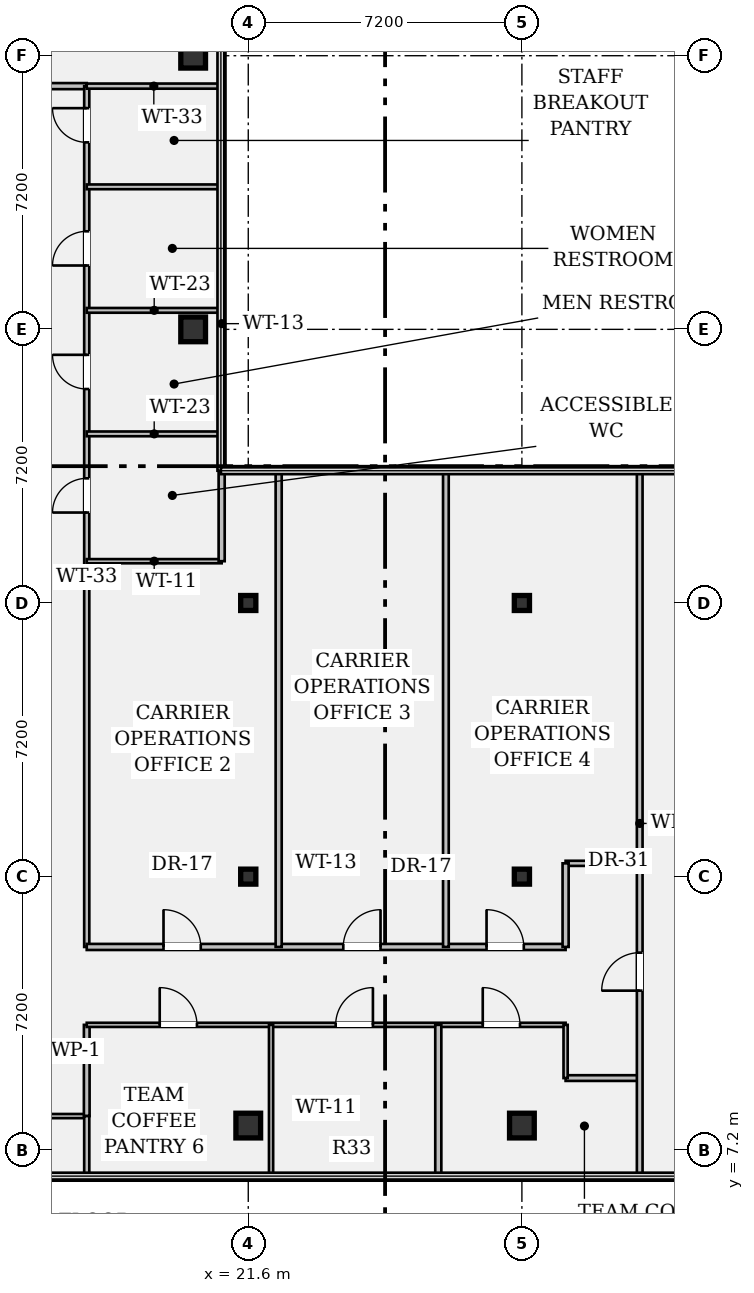
"""IFC4 building model, lengths in metres.
Left out: names, types, materials, properties, quantities, classifications, styles, units other than length and angle.
Written with IfcOpenShell. Run it as: python <this file> out.ifc"""

import sys

from ifc_helpers import new_model, si_unit, direction, frame, frame_2d, origin, origin_2d, place, context, subcontext, project, spatial, rectangle, hollow_rectangle, i_section, extrude, element, fill, save


model = new_model("IFC4")
c1 = context("Model", 3, precision=1e-05, world=origin(), true_north=direction((0.0, 1.0)))
c2 = subcontext(c1, "Body", "Model", "MODEL_VIEW")
j1 = project(units=[si_unit("LENGTHUNIT", "METRE"), si_unit("PLANEANGLEUNIT", "RADIAN")], contexts=[c1])
p1 = place(None, origin())
s1 = spatial("IfcSite", under=j1, at=p1, CompositionType="ELEMENT")
p2 = place(p1, origin())
s2 = spatial("IfcBuilding", under=s1, at=p2, CompositionType="ELEMENT")
p3 = place(p2, frame((0.0, 0.0, 290.15)))
s3 = spatial("IfcBuildingStorey", under=s2, at=p3, CompositionType="ELEMENT", Elevation=290.15)
for number, where, z_axis, x_axis in (
    (1, (20.15, 28.8, 0.0), (0.0, 0.0, 1.0), (1.0, 0.0, 0.0)),
    (2, (20.15, 36.0, 0.0), (0.0, 0.0, 1.0), (1.0, 0.0, 0.0)),
    (3, (21.6, 7.85, 0.0), (0.0, 0.0, 1.0), (1.0, 0.0, 0.0)),
):
    element("IfcColumn", number, at=place(p3, frame(where, z_axis=z_axis, x_axis=x_axis)), inside=s3, PredefinedType="COLUMN", context=c2, shape_type="SweptSolid", body=[
        extrude(hollow_rectangle(XDim=0.65, YDim=0.65, WallThickness=0.04, at=origin_2d()), origin(), (0.0, 0.0, 1.0), 3.24),
    ])
for number, where, z_axis, x_axis in (
    (4, (21.6, 14.4, 0.0), (0.0, 0.0, 1.0), (1.0, 0.0, 0.0)),
    (5, (21.6, 21.6, 0.0), (0.0, 0.0, 1.0), (1.0, 0.0, 0.0)),
):
    element("IfcColumn", number, at=place(p3, frame(where, z_axis=z_axis, x_axis=x_axis)), inside=s3, PredefinedType="COLUMN", context=c2, shape_type="SweptSolid", body=[
        extrude(i_section(OverallWidth=0.399, OverallDepth=0.394, WebThickness=0.023, FlangeThickness=0.037, FilletRadius=0.018, at=origin_2d()), origin(), (0.0, 0.0, 1.0), 3.24),
    ])
p4 = place(p3, frame((28.8, 7.85, 0.0), z_axis=(0.0, 0.0, 1.0), x_axis=(1.0, 0.0, 0.0)))
e6 = element("IfcColumn", 6, at=p4, inside=s3, PredefinedType="COLUMN", context=c2, shape_type="SweptSolid", body=[
    extrude(hollow_rectangle(XDim=0.65, YDim=0.65, WallThickness=0.04, at=origin_2d()), origin(), (0.0, 0.0, 1.0), 3.24),
])
for number, where, z_axis, x_axis in (
    (7, (28.8, 14.4, 0.0), (0.0, 0.0, 1.0), (1.0, 0.0, 0.0)),
    (8, (28.8, 21.6, 0.0), (0.0, 0.0, 1.0), (1.0, 0.0, 0.0)),
):
    element("IfcColumn", number, at=place(p3, frame(where, z_axis=z_axis, x_axis=x_axis)), inside=s3, PredefinedType="COLUMN", context=c2, shape_type="SweptSolid", body=[
        extrude(i_section(OverallWidth=0.399, OverallDepth=0.394, WebThickness=0.023, FlangeThickness=0.037, FilletRadius=0.018, at=origin_2d()), origin(), (0.0, 0.0, 1.0), 3.24),
    ])
p5 = place(p3, frame((14.4, 8.1, 0.0), z_axis=(0.0, 0.0, 1.0), x_axis=(1.0, 0.0, 0.0)))
e9 = element("IfcWall", 9, at=p5, inside=s3, PredefinedType="PARTITIONING", context=c2, shape_type="SweptSolid", body=[
    extrude(rectangle(XDim=2.95, YDim=0.11, at=frame_2d((1.475, 0.0))), origin(), (0.0, 0.0, 1.0), 3.24),
])
p6 = place(p5, frame((0.95, 0.0, 0.0)))
e10 = element("IfcOpeningElement", 10, at=p6, cuts=e9, PredefinedType="OPENING", context=c2, shape_type="SweptSolid", body=[
    extrude(rectangle(XDim=0.98, YDim=2.15, at=frame_2d((0.49, 1.075))), frame((0.0, 0.067, 0.0), z_axis=(0.0, -1.0, 0.0), x_axis=(1.0, 0.0, 0.0)), (0.0, 0.0, 1.0), 0.134),
])
p7 = place(p3, frame((14.4, 35.2, 0.0), z_axis=(0.0, 0.0, 1.0), x_axis=(1.0, 0.0, 0.0)))
e11 = element("IfcWall", 11, at=p7, inside=s3, PredefinedType="PARTITIONING", context=c2, shape_type="SweptSolid", body=[
    extrude(rectangle(XDim=2.95, YDim=0.16, at=frame_2d((1.475, 0.0))), origin(), (0.0, 0.0, 1.0), 3.24),
])
p8 = place(p7, frame((0.95, 0.0, 0.0)))
e12 = element("IfcOpeningElement", 12, at=p8, cuts=e11, PredefinedType="OPENING", context=c2, shape_type="SweptSolid", body=[
    extrude(rectangle(XDim=1.0, YDim=2.15, at=frame_2d((0.5, 1.075))), frame((0.0, 0.092, 0.0), z_axis=(0.0, -1.0, 0.0), x_axis=(1.0, 0.0, 0.0)), (0.0, 0.0, 1.0), 0.184),
])
p9 = place(p3, frame((17.35, 8.1, 0.0), z_axis=(0.0, 0.0, 1.0), x_axis=(0.0, 1.0, 0.0)))
e13 = element("IfcWall", 13, at=p9, inside=s3, PredefinedType="PARTITIONING", context=c2, shape_type="SweptSolid", body=[
    extrude(rectangle(XDim=2.4, YDim=0.15, at=frame_2d((1.2, 0.0))), origin(), (0.0, 0.0, 1.0), 3.24),
])
p10 = place(p3, frame((17.35, 12.55, 0.0), z_axis=(0.0, 0.0, 1.0), x_axis=(0.0, 1.0, 0.0)))
e14 = element("IfcWall", 14, at=p10, inside=s3, PredefinedType="PARTITIONING", context=c2, shape_type="SweptSolid", body=[
    extrude(rectangle(XDim=22.65, YDim=0.135, at=frame_2d((11.325, 0.0))), origin(), (0.0, 0.0, 1.0), 2.676),
])
p11 = place(p10, frame((11.43, 0.0, 0.0)))
e15 = element("IfcOpeningElement", 15, at=p11, cuts=e14, PredefinedType="OPENING", context=c2, shape_type="SweptSolid", body=[
    extrude(rectangle(XDim=0.9, YDim=2.15, at=frame_2d((0.45, 1.075))), frame((0.0, 0.08, 0.0), z_axis=(0.0, -1.0, 0.0), x_axis=(1.0, 0.0, 0.0)), (0.0, 0.0, 1.0), 0.159),
])
p12 = place(p10, frame((14.68, 0.0, 0.0)))
e16 = element("IfcOpeningElement", 16, at=p12, cuts=e14, PredefinedType="OPENING", context=c2, shape_type="SweptSolid", body=[
    extrude(rectangle(XDim=0.9, YDim=2.15, at=frame_2d((0.45, 1.075))), frame((0.0, 0.08, 0.0), z_axis=(0.0, -1.0, 0.0), x_axis=(1.0, 0.0, 0.0)), (0.0, 0.0, 1.0), 0.159),
])
p13 = place(p10, frame((17.93, 0.0, 0.0)))
e17 = element("IfcOpeningElement", 17, at=p13, cuts=e14, PredefinedType="OPENING", context=c2, shape_type="SweptSolid", body=[
    extrude(rectangle(XDim=0.9, YDim=2.15, at=frame_2d((0.45, 1.075))), frame((0.0, 0.08, 0.0), z_axis=(0.0, -1.0, 0.0), x_axis=(1.0, 0.0, 0.0)), (0.0, 0.0, 1.0), 0.159),
])
p14 = place(p10, frame((21.17, 0.0, 0.0)))
e18 = element("IfcOpeningElement", 18, at=p14, cuts=e14, PredefinedType="OPENING", context=c2, shape_type="SweptSolid", body=[
    extrude(rectangle(XDim=0.9, YDim=2.15, at=frame_2d((0.45, 1.075))), frame((0.0, 0.08, 0.0), z_axis=(0.0, -1.0, 0.0), x_axis=(1.0, 0.0, 0.0)), (0.0, 0.0, 1.0), 0.159),
])
p15 = place(p3, frame((17.35, 10.5, 0.0), z_axis=(0.0, 0.0, 1.0), x_axis=(1.0, 0.0, 0.0)))
e19 = element("IfcWall", 19, at=p15, inside=s3, PredefinedType="PARTITIONING", context=c2, shape_type="SweptSolid", body=[
    extrude(rectangle(XDim=12.6, YDim=0.11, at=frame_2d((6.3, 0.0))), origin(), (0.0, 0.0, 1.0), 2.676),
])
p16 = place(p15, frame((1.92, 0.0, 0.0)))
e20 = element("IfcOpeningElement", 20, at=p16, cuts=e19, PredefinedType="OPENING", context=c2, shape_type="SweptSolid", body=[
    extrude(rectangle(XDim=0.98, YDim=2.15, at=frame_2d((0.49, 1.075))), frame((0.0, 0.067, 0.0), z_axis=(0.0, -1.0, 0.0), x_axis=(1.0, 0.0, 0.0)), (0.0, 0.0, 1.0), 0.134),
])
p17 = place(p15, frame((6.55, 0.0, 0.0)))
e21 = element("IfcOpeningElement", 21, at=p17, cuts=e19, PredefinedType="OPENING", context=c2, shape_type="SweptSolid", body=[
    extrude(rectangle(XDim=0.98, YDim=2.15, at=frame_2d((0.49, 1.075))), frame((0.0, 0.067, 0.0), z_axis=(0.0, -1.0, 0.0), x_axis=(1.0, 0.0, 0.0)), (0.0, 0.0, 1.0), 0.134),
])
p18 = place(p15, frame((10.42, 0.0, 0.0)))
e22 = element("IfcOpeningElement", 22, at=p18, cuts=e19, PredefinedType="OPENING", context=c2, shape_type="SweptSolid", body=[
    extrude(rectangle(XDim=0.98, YDim=2.15, at=frame_2d((0.49, 1.075))), frame((0.0, 0.067, 0.0), z_axis=(0.0, -1.0, 0.0), x_axis=(1.0, 0.0, 0.0)), (0.0, 0.0, 1.0), 0.134),
])
p19 = place(p3, frame((17.35, 12.55, 0.0), z_axis=(0.0, 0.0, 1.0), x_axis=(1.0, 0.0, 0.0)))
e23 = element("IfcWall", 23, at=p19, inside=s3, PredefinedType="PARTITIONING", context=c2, shape_type="SweptSolid", body=[
    extrude(rectangle(XDim=12.6, YDim=0.16, at=frame_2d((6.3, 0.0))), origin(), (0.0, 0.0, 1.0), 2.676),
])
p20 = place(p19, frame((2.02, 0.0, 0.0)))
e24 = element("IfcOpeningElement", 24, at=p20, cuts=e23, PredefinedType="OPENING", context=c2, shape_type="SweptSolid", body=[
    extrude(rectangle(XDim=0.98, YDim=2.15, at=frame_2d((0.49, 1.075))), frame((0.0, 0.092, 0.0), z_axis=(0.0, -1.0, 0.0), x_axis=(1.0, 0.0, 0.0)), (0.0, 0.0, 1.0), 0.184),
])
p21 = place(p19, frame((6.75, 0.0, 0.0)))
e25 = element("IfcOpeningElement", 25, at=p21, cuts=e23, PredefinedType="OPENING", context=c2, shape_type="SweptSolid", body=[
    extrude(rectangle(XDim=0.98, YDim=2.15, at=frame_2d((0.49, 1.075))), frame((0.0, 0.092, 0.0), z_axis=(0.0, -1.0, 0.0), x_axis=(1.0, 0.0, 0.0)), (0.0, 0.0, 1.0), 0.184),
])
p22 = place(p19, frame((10.52, 0.0, 0.0)))
e26 = element("IfcOpeningElement", 26, at=p22, cuts=e23, PredefinedType="OPENING", context=c2, shape_type="SweptSolid", body=[
    extrude(rectangle(XDim=0.98, YDim=2.15, at=frame_2d((0.49, 1.075))), frame((0.0, 0.092, 0.0), z_axis=(0.0, -1.0, 0.0), x_axis=(1.0, 0.0, 0.0)), (0.0, 0.0, 1.0), 0.184),
])
p23 = place(p3, frame((29.95, 9.1, 0.0), z_axis=(0.0, 0.0, 1.0), x_axis=(1.0, 0.0, 0.0)))
e27 = element("IfcWall", 27, at=p23, inside=s3, PredefinedType="PARTITIONING", context=c2, shape_type="SweptSolid", body=[
    extrude(rectangle(XDim=1.95, YDim=0.15, at=frame_2d((0.975, 0.0))), origin(), (0.0, 0.0, 1.0), 3.24),
])
p24 = place(p3, frame((29.95, 14.75, 0.0), z_axis=(0.0, 0.0, 1.0), x_axis=(1.0, 0.0, 0.0)))
e28 = element("IfcWall", 28, at=p24, inside=s3, PredefinedType="PARTITIONING", context=c2, shape_type="SweptSolid", body=[
    extrude(rectangle(XDim=1.95, YDim=0.135, at=frame_2d((0.975, 0.0))), origin(), (0.0, 0.0, 1.0), 2.915),
])
p25 = place(p3, frame((29.95, 9.1, 0.0), z_axis=(0.0, 0.0, 1.0), x_axis=(0.0, 1.0, 0.0)))
e29 = element("IfcWall", 29, at=p25, inside=s3, PredefinedType="PARTITIONING", context=c2, shape_type="SweptSolid", body=[
    extrude(rectangle(XDim=1.4, YDim=0.11, at=frame_2d((0.7, 0.0))), origin(), (0.0, 0.0, 1.0), 3.24),
])
p26 = place(p3, frame((29.95, 12.55, 0.0), z_axis=(0.0, 0.0, 1.0), x_axis=(0.0, 1.0, 0.0)))
e30 = element("IfcWall", 30, at=p26, inside=s3, PredefinedType="PARTITIONING", context=c2, shape_type="SweptSolid", body=[
    extrude(rectangle(XDim=2.2, YDim=0.16, at=frame_2d((1.1, 0.0))), origin(), (0.0, 0.0, 1.0), 2.676),
])
p27 = place(p3, frame((31.9, 6.52, 0.0), z_axis=(0.0, 0.0, 1.0), x_axis=(0.0, 1.0, 0.0)))
e31 = element("IfcWall", 31, at=p27, inside=s3, PredefinedType="PARTITIONING", context=c2, shape_type="SweptSolid", body=[
    extrude(rectangle(XDim=18.56, YDim=0.15, at=frame_2d((9.28, 0.0))), origin(), (0.0, 0.0, 1.0), 2.676),
])
p28 = place(p27, frame((4.88, 0.0, 0.0)))
e32 = element("IfcOpeningElement", 32, at=p28, cuts=e31, PredefinedType="OPENING", context=c2, shape_type="SweptSolid", body=[
    extrude(rectangle(XDim=1.0, YDim=2.15, at=frame_2d((0.5, 1.075))), frame((0.0, 0.087, 0.0), z_axis=(0.0, -1.0, 0.0), x_axis=(1.0, 0.0, 0.0)), (0.0, 0.0, 1.0), 0.174),
])
p29 = place(p3, frame((17.35, 35.2, 0.0), z_axis=(0.0, 0.0, 1.0), x_axis=(1.0, 0.0, 0.0)))
e33 = element("IfcWall", 33, at=p29, inside=s3, PredefinedType="PARTITIONING", context=c2, shape_type="SweptSolid", body=[
    extrude(rectangle(XDim=3.53, YDim=0.135, at=frame_2d((1.765, 0.0))), origin(), (0.0, 0.0, 1.0), 3.24),
])
p30 = place(p3, frame((17.35, 22.7, 0.0), z_axis=(0.0, 0.0, 1.0), x_axis=(1.0, 0.0, 0.0)))
e34 = element("IfcWall", 34, at=p30, inside=s3, PredefinedType="PARTITIONING", context=c2, shape_type="SweptSolid", body=[
    extrude(rectangle(XDim=3.55, YDim=0.11, at=frame_2d((1.775, 0.0))), origin(), (0.0, 0.0, 1.0), 2.915),
])
p31 = place(p3, frame((20.9, 22.7, 0.0), z_axis=(0.0, 0.0, 1.0), x_axis=(0.0, 1.0, 0.0)))
e35 = element("IfcWall", 35, at=p31, inside=s3, PredefinedType="PARTITIONING", context=c2, shape_type="SweptSolid", body=[
    extrude(rectangle(XDim=12.5, YDim=0.16, at=frame_2d((6.25, 0.0))), origin(), (0.0, 0.0, 1.0), 3.24),
])
p32 = place(p3, frame((17.35, 26.05, 0.0), z_axis=(0.0, 0.0, 1.0), x_axis=(1.0, 0.0, 0.0)))
e36 = element("IfcWall", 36, at=p32, inside=s3, PredefinedType="PARTITIONING", context=c2, shape_type="SweptSolid", body=[
    extrude(rectangle(XDim=3.55, YDim=0.125, at=frame_2d((1.775, 0.0))), origin(), (0.0, 0.0, 1.0), 2.915),
])
for number, where, z_axis, x_axis in (
    (37, (17.35, 29.3, 0.0), (0.0, 0.0, 1.0), (1.0, 0.0, 0.0)),
    (38, (17.35, 32.55, 0.0), (0.0, 0.0, 1.0), (1.0, 0.0, 0.0)),
):
    element("IfcWall", number, at=place(p3, frame(where, z_axis=z_axis, x_axis=x_axis)), inside=s3, PredefinedType="PARTITIONING", context=c2, shape_type="SweptSolid", body=[
        extrude(rectangle(XDim=3.55, YDim=0.125, at=frame_2d((1.775, 0.0))), origin(), (0.0, 0.0, 1.0), 3.24),
    ])
p33 = place(p3, frame((22.4, 12.55, 0.0), z_axis=(0.0, 0.0, 1.0), x_axis=(0.0, 1.0, 0.0)))
e39 = element("IfcWall", 39, at=p33, inside=s3, PredefinedType="PARTITIONING", context=c2, shape_type="SweptSolid", body=[
    extrude(rectangle(XDim=12.5, YDim=0.16, at=frame_2d((6.25, 0.0))), origin(), (0.0, 0.0, 1.0), 2.325),
])
p34 = place(p3, frame((26.8, 12.55, 0.0), z_axis=(0.0, 0.0, 1.0), x_axis=(0.0, 1.0, 0.0)))
e40 = element("IfcWall", 40, at=p34, inside=s3, PredefinedType="PARTITIONING", context=c2, shape_type="SweptSolid", body=[
    extrude(rectangle(XDim=12.5, YDim=0.15, at=frame_2d((6.25, 0.0))), origin(), (0.0, 0.0, 1.0), 2.325),
])
p35 = place(p3, frame((17.35, 6.52, 0.0), z_axis=(0.0, 0.0, 1.0), x_axis=(0.0, 1.0, 0.0)))
e41 = element("IfcWall", 41, at=p35, inside=s3, PredefinedType="PARTITIONING", context=c2, shape_type="SweptSolid", body=[
    extrude(rectangle(XDim=1.58, YDim=0.135, at=frame_2d((0.79, 0.0))), origin(), (0.0, 0.0, 1.0), 3.24),
])
p36 = place(p3, frame((22.2, 6.52, 0.0), z_axis=(0.0, 0.0, 1.0), x_axis=(0.0, 1.0, 0.0)))
e42 = element("IfcWall", 42, at=p36, inside=s3, PredefinedType="PARTITIONING", context=c2, shape_type="SweptSolid", body=[
    extrude(rectangle(XDim=3.98, YDim=0.11, at=frame_2d((1.99, 0.0))), origin(), (0.0, 0.0, 1.0), 3.24),
])
p37 = place(p3, frame((26.6, 6.52, 0.0), z_axis=(0.0, 0.0, 1.0), x_axis=(0.0, 1.0, 0.0)))
e43 = element("IfcWall", 43, at=p37, inside=s3, PredefinedType="PARTITIONING", context=c2, shape_type="SweptSolid", body=[
    extrude(rectangle(XDim=3.98, YDim=0.16, at=frame_2d((1.99, 0.0))), origin(), (0.0, 0.0, 1.0), 3.24),
])
p38 = place(p11, origin())
e44 = element("IfcDoor", 44, at=p38, inside=s3, OperationType="SINGLE_SWING_LEFT", PredefinedType="DOOR", context=c2, shape_type="SweptSolid", body=[
    extrude(rectangle(XDim=0.9, YDim=2.15, at=frame_2d((0.45, 1.075))), frame((0.0, 0.025, 0.0), z_axis=(0.0, -1.0, 0.0), x_axis=(1.0, 0.0, 0.0)), (0.0, 0.0, 1.0), 0.05),
])
fill(e15, e44)
p39 = place(p12, origin())
e45 = element("IfcDoor", 45, at=p39, inside=s3, OperationType="SINGLE_SWING_RIGHT", PredefinedType="DOOR", context=c2, shape_type="SweptSolid", body=[
    extrude(rectangle(XDim=0.9, YDim=2.15, at=frame_2d((0.45, 1.075))), frame((0.0, 0.025, 0.0), z_axis=(0.0, -1.0, 0.0), x_axis=(1.0, 0.0, 0.0)), (0.0, 0.0, 1.0), 0.05),
])
fill(e16, e45)
p40 = place(p13, origin())
e46 = element("IfcDoor", 46, at=p40, inside=s3, OperationType="SINGLE_SWING_LEFT", PredefinedType="DOOR", context=c2, shape_type="SweptSolid", body=[
    extrude(rectangle(XDim=0.9, YDim=2.15, at=frame_2d((0.45, 1.075))), frame((0.0, 0.025, 0.0), z_axis=(0.0, -1.0, 0.0), x_axis=(1.0, 0.0, 0.0)), (0.0, 0.0, 1.0), 0.05),
])
fill(e17, e46)
p41 = place(p14, origin())
e47 = element("IfcDoor", 47, at=p41, inside=s3, OperationType="SINGLE_SWING_RIGHT", PredefinedType="DOOR", context=c2, shape_type="SweptSolid", body=[
    extrude(rectangle(XDim=0.9, YDim=2.15, at=frame_2d((0.45, 1.075))), frame((0.0, 0.025, 0.0), z_axis=(0.0, -1.0, 0.0), x_axis=(1.0, 0.0, 0.0)), (0.0, 0.0, 1.0), 0.05),
])
fill(e18, e47)
p42 = place(p20, origin())
e48 = element("IfcDoor", 48, at=p42, inside=s3, OperationType="SINGLE_SWING_LEFT", PredefinedType="DOOR", context=c2, shape_type="SweptSolid", body=[
    extrude(rectangle(XDim=0.98, YDim=2.15, at=frame_2d((0.49, 1.075))), frame((0.0, 0.025, 0.0), z_axis=(0.0, -1.0, 0.0), x_axis=(1.0, 0.0, 0.0)), (0.0, 0.0, 1.0), 0.05),
])
fill(e24, e48)
p43 = place(p21, origin())
e49 = element("IfcDoor", 49, at=p43, inside=s3, OperationType="SINGLE_SWING_RIGHT", PredefinedType="DOOR", context=c2, shape_type="SweptSolid", body=[
    extrude(rectangle(XDim=0.98, YDim=2.15, at=frame_2d((0.49, 1.075))), frame((0.0, 0.025, 0.0), z_axis=(0.0, -1.0, 0.0), x_axis=(1.0, 0.0, 0.0)), (0.0, 0.0, 1.0), 0.05),
])
fill(e25, e49)
p44 = place(p22, origin())
e50 = element("IfcDoor", 50, at=p44, inside=s3, OperationType="SINGLE_SWING_LEFT", PredefinedType="DOOR", context=c2, shape_type="SweptSolid", body=[
    extrude(rectangle(XDim=0.98, YDim=2.15, at=frame_2d((0.49, 1.075))), frame((0.0, 0.025, 0.0), z_axis=(0.0, -1.0, 0.0), x_axis=(1.0, 0.0, 0.0)), (0.0, 0.0, 1.0), 0.05),
])
fill(e26, e50)
p45 = place(p16, origin())
e51 = element("IfcDoor", 51, at=p45, inside=s3, OperationType="SINGLE_SWING_LEFT", PredefinedType="DOOR", context=c2, shape_type="SweptSolid", body=[
    extrude(rectangle(XDim=0.98, YDim=2.15, at=frame_2d((0.49, 1.075))), frame((0.0, 0.025, 0.0), z_axis=(0.0, -1.0, 0.0), x_axis=(1.0, 0.0, 0.0)), (0.0, 0.0, 1.0), 0.05),
])
fill(e20, e51)
p46 = place(p17, origin())
e52 = element("IfcDoor", 52, at=p46, inside=s3, OperationType="SINGLE_SWING_RIGHT", PredefinedType="DOOR", context=c2, shape_type="SweptSolid", body=[
    extrude(rectangle(XDim=0.98, YDim=2.15, at=frame_2d((0.49, 1.075))), frame((0.0, 0.025, 0.0), z_axis=(0.0, -1.0, 0.0), x_axis=(1.0, 0.0, 0.0)), (0.0, 0.0, 1.0), 0.05),
])
fill(e21, e52)
p47 = place(p18, origin())
e53 = element("IfcDoor", 53, at=p47, inside=s3, OperationType="SINGLE_SWING_LEFT", PredefinedType="DOOR", context=c2, shape_type="SweptSolid", body=[
    extrude(rectangle(XDim=0.98, YDim=2.15, at=frame_2d((0.49, 1.075))), frame((0.0, 0.025, 0.0), z_axis=(0.0, -1.0, 0.0), x_axis=(1.0, 0.0, 0.0)), (0.0, 0.0, 1.0), 0.05),
])
fill(e22, e53)
p48 = place(p28, origin())
e54 = element("IfcDoor", 54, at=p48, inside=s3, OperationType="SINGLE_SWING_LEFT", PredefinedType="DOOR", context=c2, shape_type="SweptSolid", body=[
    extrude(rectangle(XDim=1.0, YDim=2.15, at=frame_2d((0.5, 1.075))), frame((0.0, 0.025, 0.0), z_axis=(0.0, -1.0, 0.0), x_axis=(1.0, 0.0, 0.0)), (0.0, 0.0, 1.0), 0.05),
])
fill(e32, e54)
save(model, sys.argv[1])
